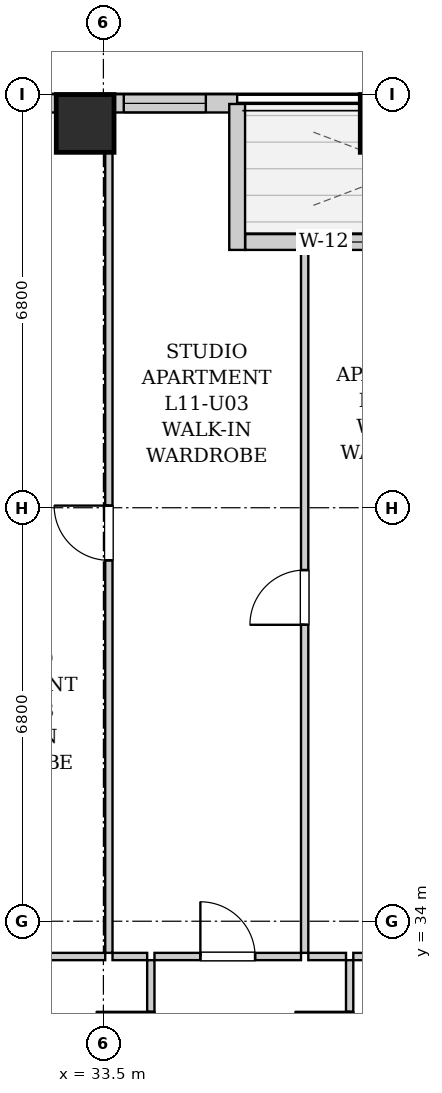
"""IFC4 building model, lengths in metres.
Left out: names, types, materials, properties, quantities, classifications, styles, units other than length and angle.
Written with IfcOpenShell. Run it as: python <this file> out.ifc"""

import sys

from ifc_helpers import new_model, si_unit, direction, frame, frame_2d, origin, origin_2d, place, context, subcontext, project, spatial, rectangle, extrude, element, fill, save


model = new_model("IFC4")
c1 = context("Model", 3, precision=1e-05, world=origin(), true_north=direction((0.0, 1.0)))
c2 = subcontext(c1, "Body", "Model", "MODEL_VIEW")
j1 = project(units=[si_unit("LENGTHUNIT", "METRE"), si_unit("PLANEANGLEUNIT", "RADIAN")], contexts=[c1])
p1 = place(None, origin())
s1 = spatial("IfcSite", under=j1, at=p1, CompositionType="ELEMENT")
p2 = place(p1, origin())
s2 = spatial("IfcBuilding", under=s1, at=p2, CompositionType="ELEMENT")
p3 = place(p2, frame((0.0, 0.0, 45.0)))
s3 = spatial("IfcBuildingStorey", under=s2, at=p3, CompositionType="ELEMENT", Elevation=45.0)
for number, where, z_axis, x_axis in (
    (1, (33.2, 47.12, 0.0), (0.0, 0.0, 1.0), (1.0, 0.0, 0.0)),
    (2, (38.2, 47.12, 0.0), (0.0, 0.0, 1.0), (1.0, 0.0, 0.0)),
):
    element("IfcColumn", number, at=place(p3, frame(where, z_axis=z_axis, x_axis=x_axis)), inside=s3, PredefinedType="COLUMN", context=c2, shape_type="SweptSolid", body=[
        extrude(rectangle(XDim=0.95, YDim=0.95, at=origin_2d()), origin(), (0.0, 0.0, 1.0), 3.2),
    ])
p4 = place(p3, frame((10.0, 47.45, 0.0), z_axis=(0.0, 0.0, 1.0), x_axis=(1.0, 0.0, 0.0)))
e3 = element("IfcWall", 3, at=p4, inside=s3, PredefinedType="SOLIDWALL", context=c2, shape_type="SweptSolid", body=[
    extrude(rectangle(XDim=25.7, YDim=0.3, at=frame_2d((12.85, 0.0))), origin(), (0.0, 0.0, 1.0), 1.975),
])
p5 = place(p4, frame((1.73, 0.0, 0.55)))
e4 = element("IfcOpeningElement", 4, at=p5, cuts=e3, PredefinedType="OPENING", context=c2, shape_type="SweptSolid", body=[
    extrude(rectangle(XDim=1.8, YDim=1.2, at=frame_2d((0.9, 0.6))), frame((0.0, 0.16, 0.0), z_axis=(0.0, -1.0, 0.0), x_axis=(1.0, 0.0, 0.0)), (0.0, 0.0, 1.0), 0.32),
])
p6 = place(p4, frame((4.961, 0.0, 0.55)))
e5 = element("IfcOpeningElement", 5, at=p6, cuts=e3, PredefinedType="OPENING", context=c2, shape_type="SweptSolid", body=[
    extrude(rectangle(XDim=1.8, YDim=1.2, at=frame_2d((0.9, 0.6))), frame((0.0, 0.16, 0.0), z_axis=(0.0, -1.0, 0.0), x_axis=(1.0, 0.0, 0.0)), (0.0, 0.0, 1.0), 0.32),
])
p7 = place(p4, frame((8.435, 0.0, 0.55)))
e6 = element("IfcOpeningElement", 6, at=p7, cuts=e3, PredefinedType="OPENING", context=c2, shape_type="SweptSolid", body=[
    extrude(rectangle(XDim=1.8, YDim=1.2, at=frame_2d((0.9, 0.6))), frame((0.0, 0.16, 0.0), z_axis=(0.0, -1.0, 0.0), x_axis=(1.0, 0.0, 0.0)), (0.0, 0.0, 1.0), 0.32),
])
p8 = place(p4, frame((11.15, 0.0, 0.55)))
e7 = element("IfcOpeningElement", 7, at=p8, cuts=e3, PredefinedType="OPENING", context=c2, shape_type="SweptSolid", body=[
    extrude(rectangle(XDim=1.35, YDim=1.2, at=frame_2d((0.675, 0.6))), frame((0.0, 0.16, 0.0), z_axis=(0.0, -1.0, 0.0), x_axis=(1.0, 0.0, 0.0)), (0.0, 0.0, 1.0), 0.32),
])
p9 = place(p4, frame((17.812, 0.0, 0.55)))
e8 = element("IfcOpeningElement", 8, at=p9, cuts=e3, PredefinedType="OPENING", context=c2, shape_type="SweptSolid", body=[
    extrude(rectangle(XDim=1.8, YDim=1.2, at=frame_2d((0.9, 0.6))), frame((0.0, 0.16, 0.0), z_axis=(0.0, -1.0, 0.0), x_axis=(1.0, 0.0, 0.0)), (0.0, 0.0, 1.0), 0.32),
])
p10 = place(p4, frame((20.765, 0.0, 0.55)))
e9 = element("IfcOpeningElement", 9, at=p10, cuts=e3, PredefinedType="OPENING", context=c2, shape_type="SweptSolid", body=[
    extrude(rectangle(XDim=1.8, YDim=1.2, at=frame_2d((0.9, 0.6))), frame((0.0, 0.16, 0.0), z_axis=(0.0, -1.0, 0.0), x_axis=(1.0, 0.0, 0.0)), (0.0, 0.0, 1.0), 0.32),
])
p11 = place(p4, frame((23.835, 0.0, 0.55)))
e10 = element("IfcOpeningElement", 10, at=p11, cuts=e3, PredefinedType="OPENING", context=c2, shape_type="SweptSolid", body=[
    extrude(rectangle(XDim=1.35, YDim=1.2, at=frame_2d((0.675, 0.6))), frame((0.0, 0.16, 0.0), z_axis=(0.0, -1.0, 0.0), x_axis=(1.0, 0.0, 0.0)), (0.0, 0.0, 1.0), 0.32),
])
p12 = place(p3, frame((35.7, 47.44, 0.0), z_axis=(0.0, 0.0, 1.0), x_axis=(0.0, -1.0, 0.0)))
e11 = element("IfcWall", 11, at=p12, inside=s3, PredefinedType="SOLIDWALL", context=c2, shape_type="SweptSolid", body=[
    extrude(rectangle(XDim=2.4, YDim=0.26, at=frame_2d((1.2, 0.0))), origin(), (0.0, 0.0, 1.0), 2.94),
])
p13 = place(p3, frame((35.834, 45.17, 0.0), z_axis=(0.0, 0.0, 1.0), x_axis=(1.0, 0.0, 0.0)))
e12 = element("IfcWall", 12, at=p13, inside=s3, PredefinedType="SOLIDWALL", context=c2, shape_type="SweptSolid", body=[
    extrude(rectangle(XDim=5.432, YDim=0.26, at=frame_2d((2.716, 0.0))), origin(), (0.0, 0.0, 1.0), 2.94),
])
p14 = place(p13, frame((2.166, 0.0, 0.0)))
e13 = element("IfcOpeningElement", 13, at=p14, cuts=e12, PredefinedType="OPENING", context=c2, shape_type="SweptSolid", body=[
    extrude(rectangle(XDim=1.1, YDim=2.0, at=frame_2d((0.55, 1.0))), frame((0.0, 0.14, 0.0), z_axis=(0.0, -1.0, 0.0), x_axis=(1.0, 0.0, 0.0)), (0.0, 0.0, 1.0), 0.28),
])
p15 = place(p13, frame((1.326, 0.0, 0.55)))
e14 = element("IfcOpeningElement", 14, at=p15, cuts=e12, PredefinedType="OPENING", context=c2, shape_type="SweptSolid", body=[
    extrude(rectangle(XDim=0.68, YDim=1.2, at=frame_2d((0.34, 0.6))), frame((0.0, 0.14, 0.0), z_axis=(0.0, -1.0, 0.0), x_axis=(1.0, 0.0, 0.0)), (0.0, 0.0, 1.0), 0.28),
])
p16 = place(p3, frame((34.28, 30.76, 0.0), z_axis=(0.0, 0.0, 1.0), x_axis=(0.0, 1.0, 0.0)))
e15 = element("IfcWall", 15, at=p16, inside=s3, PredefinedType="PARTITIONING", context=c2, shape_type="SweptSolid", body=[
    extrude(rectangle(XDim=2.6, YDim=0.12, at=frame_2d((1.3, 0.0))), origin(), (0.0, 0.0, 1.0), 2.94),
])
p17 = place(p16, frame((0.85, 0.0, 0.0)))
e16 = element("IfcOpeningElement", 16, at=p17, cuts=e15, PredefinedType="OPENING", context=c2, shape_type="SweptSolid", body=[
    extrude(rectangle(XDim=0.9, YDim=2.05, at=frame_2d((0.45, 1.025))), frame((0.0, 0.07, 0.0), z_axis=(0.0, -1.0, 0.0), x_axis=(1.0, 0.0, 0.0)), (0.0, 0.0, 1.0), 0.14),
])
p18 = place(p3, frame((30.62, 33.42, 0.0), z_axis=(0.0, 0.0, 1.0), x_axis=(1.0, 0.0, 0.0)))
e17 = element("IfcWall", 17, at=p18, inside=s3, PredefinedType="PARTITIONING", context=c2, shape_type="SweptSolid", body=[
    extrude(rectangle(XDim=2.91, YDim=0.12, at=frame_2d((1.455, 0.0))), origin(), (0.0, 0.0, 1.0), 2.94),
])
p19 = place(p18, frame((1.005, 0.0, 0.0)))
e18 = element("IfcOpeningElement", 18, at=p19, cuts=e17, PredefinedType="OPENING", context=c2, shape_type="SweptSolid", body=[
    extrude(rectangle(XDim=0.9, YDim=2.05, at=frame_2d((0.45, 1.025))), frame((0.0, 0.07, 0.0), z_axis=(0.0, -1.0, 0.0), x_axis=(1.0, 0.0, 0.0)), (0.0, 0.0, 1.0), 0.14),
])
p20 = place(p3, frame((33.65, 33.42, 0.0), z_axis=(0.0, 0.0, 1.0), x_axis=(1.0, 0.0, 0.0)))
e19 = element("IfcWall", 19, at=p20, inside=s3, PredefinedType="PARTITIONING", context=c2, shape_type="SweptSolid", body=[
    extrude(rectangle(XDim=0.57, YDim=0.12, at=frame_2d((0.285, 0.0))), origin(), (0.0, 0.0, 1.0), 2.94),
])
p21 = place(p3, frame((37.55, 30.76, 0.0), z_axis=(0.0, 0.0, 1.0), x_axis=(0.0, 1.0, 0.0)))
e20 = element("IfcWall", 20, at=p21, inside=s3, PredefinedType="PARTITIONING", context=c2, shape_type="SweptSolid", body=[
    extrude(rectangle(XDim=2.6, YDim=0.12, at=frame_2d((1.3, 0.0))), origin(), (0.0, 0.0, 1.0), 2.94),
])
p22 = place(p21, frame((0.85, 0.0, 0.0)))
e21 = element("IfcOpeningElement", 21, at=p22, cuts=e20, PredefinedType="OPENING", context=c2, shape_type="SweptSolid", body=[
    extrude(rectangle(XDim=0.9, YDim=2.05, at=frame_2d((0.45, 1.025))), frame((0.0, 0.07, 0.0), z_axis=(0.0, -1.0, 0.0), x_axis=(1.0, 0.0, 0.0)), (0.0, 0.0, 1.0), 0.14),
])
p23 = place(p3, frame((34.34, 33.42, 0.0), z_axis=(0.0, 0.0, 1.0), x_axis=(1.0, 0.0, 0.0)))
e22 = element("IfcWall", 22, at=p23, inside=s3, PredefinedType="PARTITIONING", context=c2, shape_type="SweptSolid", body=[
    extrude(rectangle(XDim=2.41, YDim=0.12, at=frame_2d((1.205, 0.0))), origin(), (0.0, 0.0, 1.0), 2.94),
])
p24 = place(p23, frame((0.755, 0.0, 0.0)))
e23 = element("IfcOpeningElement", 23, at=p24, cuts=e22, PredefinedType="OPENING", context=c2, shape_type="SweptSolid", body=[
    extrude(rectangle(XDim=0.9, YDim=2.05, at=frame_2d((0.45, 1.025))), frame((0.0, 0.07, 0.0), z_axis=(0.0, -1.0, 0.0), x_axis=(1.0, 0.0, 0.0)), (0.0, 0.0, 1.0), 0.14),
])
p25 = place(p3, frame((36.87, 33.42, 0.0), z_axis=(0.0, 0.0, 1.0), x_axis=(1.0, 0.0, 0.0)))
e24 = element("IfcWall", 24, at=p25, inside=s3, PredefinedType="PARTITIONING", context=c2, shape_type="SweptSolid", body=[
    extrude(rectangle(XDim=0.62, YDim=0.12, at=frame_2d((0.31, 0.0))), origin(), (0.0, 0.0, 1.0), 2.94),
])
p26 = place(p3, frame((37.61, 33.42, 0.0), z_axis=(0.0, 0.0, 1.0), x_axis=(1.0, 0.0, 0.0)))
e25 = element("IfcWall", 25, at=p26, inside=s3, PredefinedType="PARTITIONING", context=c2, shape_type="SweptSolid", body=[
    extrude(rectangle(XDim=2.36, YDim=0.12, at=frame_2d((1.18, 0.0))), origin(), (0.0, 0.0, 1.0), 2.94),
])
p27 = place(p26, frame((0.73, 0.0, 0.0)))
e26 = element("IfcOpeningElement", 26, at=p27, cuts=e25, PredefinedType="OPENING", context=c2, shape_type="SweptSolid", body=[
    extrude(rectangle(XDim=0.9, YDim=2.05, at=frame_2d((0.45, 1.025))), frame((0.0, 0.07, 0.0), z_axis=(0.0, -1.0, 0.0), x_axis=(1.0, 0.0, 0.0)), (0.0, 0.0, 1.0), 0.14),
])
p28 = place(p3, frame((33.59, 33.48, 0.0), z_axis=(0.0, 0.0, 1.0), x_axis=(0.0, 1.0, 0.0)))
e27 = element("IfcWall", 27, at=p28, inside=s3, PredefinedType="PARTITIONING", context=c2, shape_type="SweptSolid", body=[
    extrude(rectangle(XDim=13.84, YDim=0.12, at=frame_2d((6.92, 0.0))), origin(), (0.0, 0.0, 1.0), 2.94),
])
p29 = place(p28, frame((6.455, 0.0, 0.0)))
e28 = element("IfcOpeningElement", 28, at=p29, cuts=e27, PredefinedType="OPENING", context=c2, shape_type="SweptSolid", body=[
    extrude(rectangle(XDim=0.9, YDim=2.05, at=frame_2d((0.45, 1.025))), frame((0.0, 0.07, 0.0), z_axis=(0.0, -1.0, 0.0), x_axis=(1.0, 0.0, 0.0)), (0.0, 0.0, 1.0), 0.14),
])
p30 = place(p3, frame((36.81, 33.48, 0.0), z_axis=(0.0, 0.0, 1.0), x_axis=(0.0, 1.0, 0.0)))
e29 = element("IfcWall", 29, at=p30, inside=s3, PredefinedType="PARTITIONING", context=c2, shape_type="SweptSolid", body=[
    extrude(rectangle(XDim=11.69, YDim=0.12, at=frame_2d((5.845, 0.0))), origin(), (0.0, 0.0, 1.0), 2.94),
])
p31 = place(p30, frame((5.395, 0.0, 0.0)))
e30 = element("IfcOpeningElement", 30, at=p31, cuts=e29, PredefinedType="OPENING", context=c2, shape_type="SweptSolid", body=[
    extrude(rectangle(XDim=0.9, YDim=2.05, at=frame_2d((0.45, 1.025))), frame((0.0, 0.07, 0.0), z_axis=(0.0, -1.0, 0.0), x_axis=(1.0, 0.0, 0.0)), (0.0, 0.0, 1.0), 0.14),
])
p32 = place(p17, origin())
e31 = element("IfcDoor", 31, at=p32, inside=s3, OperationType="SINGLE_SWING_RIGHT", PredefinedType="DOOR", context=c2, shape_type="SweptSolid", body=[
    extrude(rectangle(XDim=0.9, YDim=2.05, at=frame_2d((0.45, 1.025))), frame((0.0, 0.025, 0.0), z_axis=(0.0, -1.0, 0.0), x_axis=(1.0, 0.0, 0.0)), (0.0, 0.0, 1.0), 0.05),
])
fill(e16, e31)
p33 = place(p22, origin())
e32 = element("IfcDoor", 32, at=p33, inside=s3, OperationType="SINGLE_SWING_RIGHT", PredefinedType="DOOR", context=c2, shape_type="SweptSolid", body=[
    extrude(rectangle(XDim=0.9, YDim=2.05, at=frame_2d((0.45, 1.025))), frame((0.0, 0.025, 0.0), z_axis=(0.0, -1.0, 0.0), x_axis=(1.0, 0.0, 0.0)), (0.0, 0.0, 1.0), 0.05),
])
fill(e21, e32)
p34 = place(p24, origin())
e33 = element("IfcDoor", 33, at=p34, inside=s3, OperationType="SINGLE_SWING_LEFT", PredefinedType="DOOR", context=c2, shape_type="SweptSolid", body=[
    extrude(rectangle(XDim=0.9, YDim=2.05, at=frame_2d((0.45, 1.025))), frame((0.0, 0.025, 0.0), z_axis=(0.0, -1.0, 0.0), x_axis=(1.0, 0.0, 0.0)), (0.0, 0.0, 1.0), 0.05),
])
fill(e23, e33)
p35 = place(p29, origin())
e34 = element("IfcDoor", 34, at=p35, inside=s3, OperationType="SINGLE_SWING_RIGHT", PredefinedType="DOOR", context=c2, shape_type="SweptSolid", body=[
    extrude(rectangle(XDim=0.9, YDim=2.05, at=frame_2d((0.45, 1.025))), frame((0.0, 0.025, 0.0), z_axis=(0.0, -1.0, 0.0), x_axis=(1.0, 0.0, 0.0)), (0.0, 0.0, 1.0), 0.05),
])
fill(e28, e34)
p36 = place(p31, origin())
e35 = element("IfcDoor", 35, at=p36, inside=s3, OperationType="SINGLE_SWING_LEFT", PredefinedType="DOOR", context=c2, shape_type="SweptSolid", body=[
    extrude(rectangle(XDim=0.9, YDim=2.05, at=frame_2d((0.45, 1.025))), frame((0.0, 0.025, 0.0), z_axis=(0.0, -1.0, 0.0), x_axis=(1.0, 0.0, 0.0)), (0.0, 0.0, 1.0), 0.05),
])
fill(e30, e35)
p37 = place(p11, origin())
e36 = element("IfcWindow", 36, at=p37, inside=s3, PartitioningType="SINGLE_PANEL", PredefinedType="WINDOW", context=c2, shape_type="SweptSolid", body=[
    extrude(rectangle(XDim=1.35, YDim=1.2, at=frame_2d((0.675, 0.6))), frame((0.0, 0.03, 0.0), z_axis=(0.0, -1.0, 0.0), x_axis=(1.0, 0.0, 0.0)), (0.0, 0.0, 1.0), 0.06),
])
fill(e10, e36)
p38 = place(p15, origin())
e37 = element("IfcWindow", 37, at=p38, inside=s3, PartitioningType="SINGLE_PANEL", PredefinedType="WINDOW", context=c2, shape_type="SweptSolid", body=[
    extrude(rectangle(XDim=0.68, YDim=1.2, at=frame_2d((0.34, 0.6))), frame((0.0, 0.03, 0.0), z_axis=(0.0, -1.0, 0.0), x_axis=(1.0, 0.0, 0.0)), (0.0, 0.0, 1.0), 0.06),
])
fill(e14, e37)
save(model, sys.argv[1])
